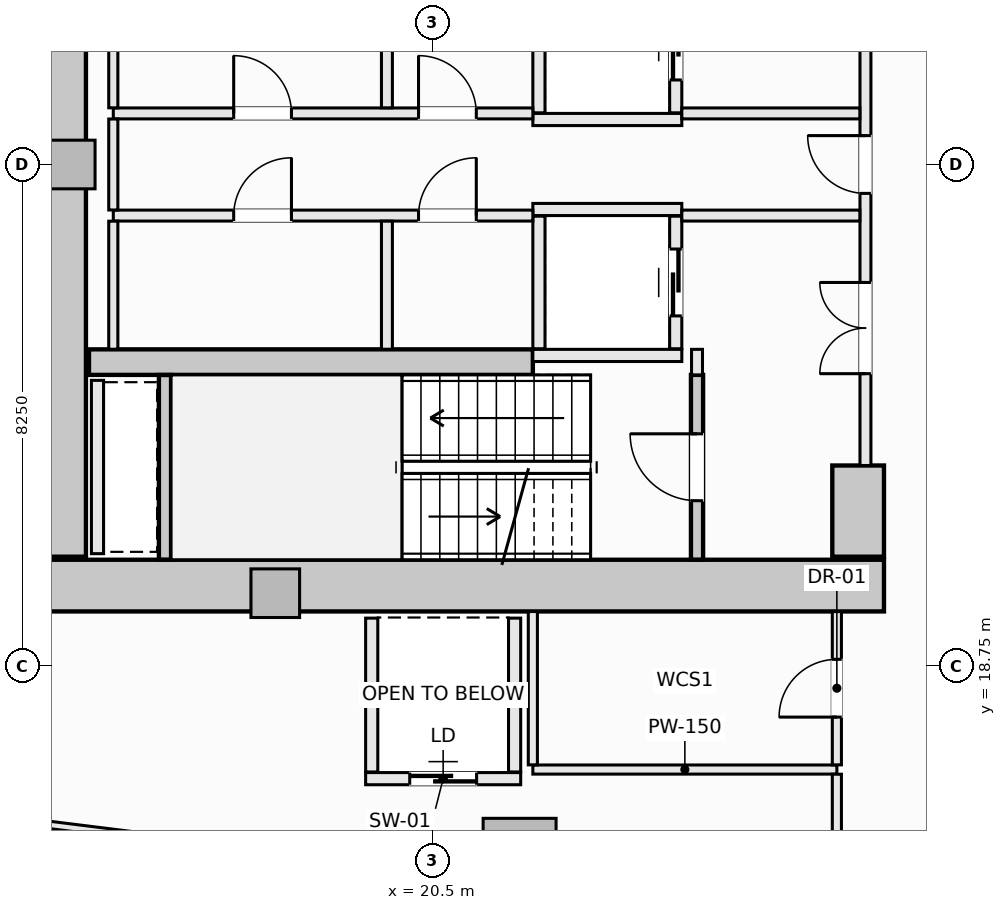
"""IFC4 building model, lengths in metres.
Left out: names, types, materials, properties, quantities, classifications, styles, units other than length and angle.
Written with IfcOpenShell. Run it as: python <this file> out.ifc"""

import sys

from ifc_helpers import new_model, si_unit, direction, frame, frame_2d, origin, origin_2d, place, context, subcontext, project, spatial, rectangle, extrude, element, fill, save


model = new_model("IFC4")
c1 = context("Model", 3, precision=1e-05, world=origin(), true_north=direction((0.0, 1.0)))
c2 = subcontext(c1, "Body", "Model", "MODEL_VIEW")
j1 = project(units=[si_unit("LENGTHUNIT", "METRE"), si_unit("PLANEANGLEUNIT", "RADIAN")], contexts=[c1])
p1 = place(None, origin())
s1 = spatial("IfcSite", under=j1, at=p1, CompositionType="ELEMENT")
p2 = place(p1, origin())
s2 = spatial("IfcBuilding", under=s1, at=p2, CompositionType="ELEMENT")
p3 = place(p2, frame((0.0, 0.0, 84.25)))
s3 = spatial("IfcBuildingStorey", under=s2, at=p3, CompositionType="ELEMENT", Elevation=84.25)
p4 = place(p3, frame((14.075, 20.075, -0.28), z_axis=(0.0, 0.0, 1.0), x_axis=(1.0, 0.0, 0.0)))
e1 = element("IfcWall", 1, at=p4, inside=s3, PredefinedType="SHEAR", context=c2, shape_type="SweptSolid", body=[
    extrude(rectangle(XDim=13.85, YDim=0.85, at=frame_2d((6.925, 0.0))), origin(), (0.0, 0.0, 1.0), 3.85),
])
p5 = place(p3, frame((14.375, 20.55, -0.28), z_axis=(0.0, 0.0, 1.0), x_axis=(0.0, 1.0, 0.0)))
e2 = element("IfcWall", 2, at=p5, inside=s3, PredefinedType="SHEAR", context=c2, shape_type="SweptSolid", body=[
    extrude(rectangle(XDim=12.9, YDim=0.85, at=frame_2d((6.45, 0.0))), origin(), (0.0, 0.0, 1.0), 3.85),
])
p6 = place(p3, frame((27.5, 20.55, -0.28), z_axis=(0.0, 0.0, 1.0), x_axis=(0.0, 1.0, 0.0)))
e3 = element("IfcWall", 3, at=p6, inside=s3, PredefinedType="SHEAR", context=c2, shape_type="SweptSolid", body=[
    extrude(rectangle(XDim=1.5, YDim=0.85, at=frame_2d((0.75, 0.0))), origin(), (0.0, 0.0, 1.0), 3.85),
])
p7 = place(p3, frame((14.85, 23.75, -0.28), z_axis=(0.0, 0.0, 1.0), x_axis=(1.0, 0.0, 0.0)))
e4 = element("IfcWall", 4, at=p7, inside=s3, PredefinedType="SHEAR", context=c2, shape_type="SweptSolid", body=[
    extrude(rectangle(XDim=7.3, YDim=0.42, at=frame_2d((3.65, 0.0))), origin(), (0.0, 0.0, 1.0), 3.85),
])
p8 = place(p3, frame((21.932, 15.648, -0.28), z_axis=(0.0, 0.0, 1.0), x_axis=(1.0, 0.0, 0.0)))
e5 = element("IfcColumn", 5, at=p8, inside=s3, PredefinedType="COLUMN", context=c2, shape_type="SweptSolid", body=[
    extrude(rectangle(XDim=1.2, YDim=1.2, at=origin_2d()), origin(), (0.0, 0.0, 1.0), 3.85),
])
for number, where, z_axis, x_axis in (
    (6, (14.55, 27.0, -0.28), (0.0, 0.0, 1.0), (1.0, 0.0, 0.0)),
    (7, (17.914, 19.95, -0.28), (0.0, 0.0, 1.0), (1.0, 0.0, 0.0)),
):
    element("IfcColumn", number, at=place(p3, frame(where, z_axis=z_axis, x_axis=x_axis)), inside=s3, PredefinedType="PILASTER", context=c2, shape_type="SweptSolid", body=[
        extrude(rectangle(XDim=0.8, YDim=0.8, at=origin_2d()), origin(), (0.0, 0.0, 1.0), 3.85),
    ])
p9 = place(p3, frame((24.85, 20.502, -0.28), z_axis=(0.0, 0.0, 1.0), x_axis=(0.0, 1.0, 0.0)))
e8 = element("IfcWall", 8, at=p9, inside=s3, PredefinedType="SHEAR", context=c2, shape_type="SweptSolid", body=[
    extrude(rectangle(XDim=3.038, YDim=0.2, at=frame_2d((1.519, 0.0))), origin(), (0.0, 0.0, 1.0), 3.85),
])
p10 = place(p9, frame((0.969, 0.0, 0.28)))
e9 = element("IfcOpeningElement", 9, at=p10, cuts=e8, PredefinedType="OPENING", context=c2, shape_type="SweptSolid", body=[
    extrude(rectangle(XDim=1.1, YDim=2.15, at=frame_2d((0.55, 1.075))), frame((0.0, 0.11, 0.0), z_axis=(0.0, -1.0, 0.0), x_axis=(1.0, 0.0, 0.0)), (0.0, 0.0, 1.0), 0.22),
])
p11 = place(p3, frame((16.1, 20.502, -0.28), z_axis=(0.0, 0.0, 1.0), x_axis=(0.0, 1.0, 0.0)))
e10 = element("IfcWall", 10, at=p11, inside=s3, PredefinedType="SHEAR", context=c2, shape_type="SweptSolid", body=[
    extrude(rectangle(XDim=3.036, YDim=0.2, at=frame_2d((1.518, 0.0))), origin(), (0.0, 0.0, 1.0), 3.85),
])
p12 = place(p3, frame((22.15, 27.74, 0.0), z_axis=(0.0, 0.0, 1.0), x_axis=(1.0, 0.0, 0.0)))
e11 = element("IfcWall", 11, at=p12, inside=s3, PredefinedType="SOLIDWALL", context=c2, shape_type="SweptSolid", body=[
    extrude(rectangle(XDim=2.45, YDim=0.2, at=frame_2d((1.225, 0.0))), origin(), (0.0, 0.0, 1.0), 3.57),
])
p13 = place(p3, frame((22.25, 27.85, 0.0), z_axis=(0.0, 0.0, 1.0), x_axis=(0.0, 1.0, 0.0)))
e12 = element("IfcWall", 12, at=p13, inside=s3, PredefinedType="SOLIDWALL", context=c2, shape_type="SweptSolid", body=[
    extrude(rectangle(XDim=2.18, YDim=0.2, at=frame_2d((1.09, 0.0))), origin(), (0.0, 0.0, 1.0), 3.57),
])
p14 = place(p3, frame((24.5, 27.85, 0.0), z_axis=(0.0, 0.0, 1.0), x_axis=(0.0, 1.0, 0.0)))
e13 = element("IfcWall", 13, at=p14, inside=s3, PredefinedType="SOLIDWALL", context=c2, shape_type="SweptSolid", body=[
    extrude(rectangle(XDim=2.18, YDim=0.2, at=frame_2d((1.09, 0.0))), origin(), (0.0, 0.0, 1.0), 3.57),
])
p15 = place(p14, frame((0.54, 0.0, 0.0)))
e14 = element("IfcOpeningElement", 14, at=p15, cuts=e13, PredefinedType="OPENING", context=c2, shape_type="SweptSolid", body=[
    extrude(rectangle(XDim=1.1, YDim=2.2, at=frame_2d((0.55, 1.1))), frame((0.0, 0.11, 0.0), z_axis=(0.0, -1.0, 0.0), x_axis=(1.0, 0.0, 0.0)), (0.0, 0.0, 1.0), 0.22),
])
for number, where, z_axis, x_axis in (
    (15, (22.15, 26.26, 0.0), (0.0, 0.0, 1.0), (1.0, 0.0, 0.0)),
    (16, (22.15, 23.86, 0.0), (0.0, 0.0, 1.0), (1.0, 0.0, 0.0)),
):
    element("IfcWall", number, at=place(p3, frame(where, z_axis=z_axis, x_axis=x_axis)), inside=s3, PredefinedType="SOLIDWALL", context=c2, shape_type="SweptSolid", body=[
        extrude(rectangle(XDim=2.45, YDim=0.2, at=frame_2d((1.225, 0.0))), origin(), (0.0, 0.0, 1.0), 3.57),
    ])
p16 = place(p3, frame((22.25, 23.97, 0.0), z_axis=(0.0, 0.0, 1.0), x_axis=(0.0, 1.0, 0.0)))
e17 = element("IfcWall", 17, at=p16, inside=s3, PredefinedType="SOLIDWALL", context=c2, shape_type="SweptSolid", body=[
    extrude(rectangle(XDim=2.18, YDim=0.2, at=frame_2d((1.09, 0.0))), origin(), (0.0, 0.0, 1.0), 3.57),
])
p17 = place(p3, frame((24.5, 23.97, 0.0), z_axis=(0.0, 0.0, 1.0), x_axis=(0.0, 1.0, 0.0)))
e18 = element("IfcWall", 18, at=p17, inside=s3, PredefinedType="SOLIDWALL", context=c2, shape_type="SweptSolid", body=[
    extrude(rectangle(XDim=2.18, YDim=0.2, at=frame_2d((1.09, 0.0))), origin(), (0.0, 0.0, 1.0), 3.57),
])
p18 = place(p17, frame((0.54, 0.0, 0.0)))
e19 = element("IfcOpeningElement", 19, at=p18, cuts=e18, PredefinedType="OPENING", context=c2, shape_type="SweptSolid", body=[
    extrude(rectangle(XDim=1.1, YDim=2.2, at=frame_2d((0.55, 1.1))), frame((0.0, 0.11, 0.0), z_axis=(0.0, -1.0, 0.0), x_axis=(1.0, 0.0, 0.0)), (0.0, 0.0, 1.0), 0.22),
])
p19 = place(p3, frame((19.4, 16.9, 0.0), z_axis=(0.0, 0.0, 1.0), x_axis=(1.0, 0.0, 0.0)))
e20 = element("IfcWall", 20, at=p19, inside=s3, PredefinedType="SOLIDWALL", context=c2, shape_type="SweptSolid", body=[
    extrude(rectangle(XDim=2.55, YDim=0.2, at=frame_2d((1.275, 0.0))), origin(), (0.0, 0.0, 1.0), 3.57),
])
p20 = place(p19, frame((0.725, 0.0, 0.0)))
e21 = element("IfcOpeningElement", 21, at=p20, cuts=e20, PredefinedType="OPENING", context=c2, shape_type="SweptSolid", body=[
    extrude(rectangle(XDim=1.1, YDim=2.2, at=frame_2d((0.55, 1.1))), frame((0.0, 0.11, 0.0), z_axis=(0.0, -1.0, 0.0), x_axis=(1.0, 0.0, 0.0)), (0.0, 0.0, 1.0), 0.22),
])
for number, where, z_axis, x_axis in (
    (22, (19.5, 17.01, 0.0), (0.0, 0.0, 1.0), (0.0, 1.0, 0.0)),
    (23, (21.85, 17.01, 0.0), (0.0, 0.0, 1.0), (0.0, 1.0, 0.0)),
):
    element("IfcWall", number, at=place(p3, frame(where, z_axis=z_axis, x_axis=x_axis)), inside=s3, PredefinedType="SOLIDWALL", context=c2, shape_type="SweptSolid", body=[
        extrude(rectangle(XDim=2.53, YDim=0.2, at=frame_2d((1.265, 0.0))), origin(), (0.0, 0.0, 1.0), 3.57),
    ])
p21 = place(p3, frame((14.99, 20.6, 0.0), z_axis=(0.0, 0.0, 1.0), x_axis=(0.0, 1.0, 0.0)))
e24 = element("IfcWall", 24, at=p21, inside=s3, PredefinedType="SOLIDWALL", context=c2, shape_type="SweptSolid", body=[
    extrude(rectangle(XDim=2.85, YDim=0.2, at=frame_2d((1.425, 0.0))), origin(), (0.0, 0.0, 1.0), 3.57),
])
p22 = place(p3, frame((24.85, 23.54, 0.0), z_axis=(0.0, 0.0, 1.0), x_axis=(0.0, 1.0, 0.0)))
e25 = element("IfcWall", 25, at=p22, inside=s3, PredefinedType="SOLIDWALL", context=c2, shape_type="SweptSolid", body=[
    extrude(rectangle(XDim=0.42, YDim=0.18, at=frame_2d((0.21, 0.0))), origin(), (0.0, 0.0, 1.0), 3.57),
])
p23 = place(p3, frame((27.62, 22.05, 0.0), z_axis=(0.0, 0.0, 1.0), x_axis=(0.0, 1.0, 0.0)))
e26 = element("IfcWall", 26, at=p23, inside=s3, PredefinedType="SOLIDWALL", context=c2, shape_type="SweptSolid", body=[
    extrude(rectangle(XDim=9.9, YDim=0.18, at=frame_2d((4.95, 0.0))), origin(), (0.0, 0.0, 1.0), 2.662),
])
p24 = place(p23, frame((4.475, 0.0, 0.0)))
e27 = element("IfcOpeningElement", 27, at=p24, cuts=e26, PredefinedType="OPENING", context=c2, shape_type="SweptSolid", body=[
    extrude(rectangle(XDim=0.95, YDim=2.1, at=frame_2d((0.475, 1.05))), frame((0.0, 0.1, 0.0), z_axis=(0.0, -1.0, 0.0), x_axis=(1.0, 0.0, 0.0)), (0.0, 0.0, 1.0), 0.2),
])
p25 = place(p23, frame((6.89, 0.0, 0.0)))
e28 = element("IfcOpeningElement", 28, at=p25, cuts=e26, PredefinedType="OPENING", context=c2, shape_type="SweptSolid", body=[
    extrude(rectangle(XDim=1.5, YDim=2.2, at=frame_2d((0.75, 1.1))), frame((0.0, 0.1, 0.0), z_axis=(0.0, -1.0, 0.0), x_axis=(1.0, 0.0, 0.0)), (0.0, 0.0, 1.0), 0.2),
])
p26 = place(p23, frame((1.51, 0.0, 0.0)))
e29 = element("IfcOpeningElement", 29, at=p26, cuts=e26, PredefinedType="OPENING", context=c2, shape_type="SweptSolid", body=[
    extrude(rectangle(XDim=1.5, YDim=2.2, at=frame_2d((0.75, 1.1))), frame((0.0, 0.1, 0.0), z_axis=(0.0, -1.0, 0.0), x_axis=(1.0, 0.0, 0.0)), (0.0, 0.0, 1.0), 0.2),
])
p27 = place(p3, frame((15.25, 27.84, 0.0), z_axis=(0.0, 0.0, 1.0), x_axis=(1.0, 0.0, 0.0)))
e30 = element("IfcWall", 30, at=p27, inside=s3, PredefinedType="SOLIDWALL", context=c2, shape_type="SweptSolid", body=[
    extrude(rectangle(XDim=6.9, YDim=0.18, at=frame_2d((3.45, 0.0))), origin(), (0.0, 0.0, 1.0), 3.57),
])
p28 = place(p27, frame((5.02, 0.0, 0.0)))
e31 = element("IfcOpeningElement", 31, at=p28, cuts=e30, PredefinedType="OPENING", context=c2, shape_type="SweptSolid", body=[
    extrude(rectangle(XDim=0.95, YDim=2.1, at=frame_2d((0.475, 1.05))), frame((0.0, 0.1, 0.0), z_axis=(0.0, -1.0, 0.0), x_axis=(1.0, 0.0, 0.0)), (0.0, 0.0, 1.0), 0.2),
])
p29 = place(p27, frame((1.98, 0.0, 0.0)))
e32 = element("IfcOpeningElement", 32, at=p29, cuts=e30, PredefinedType="OPENING", context=c2, shape_type="SweptSolid", body=[
    extrude(rectangle(XDim=0.95, YDim=2.1, at=frame_2d((0.475, 1.05))), frame((0.0, 0.1, 0.0), z_axis=(0.0, -1.0, 0.0), x_axis=(1.0, 0.0, 0.0)), (0.0, 0.0, 1.0), 0.2),
])
p30 = place(p3, frame((24.6, 27.84, 0.0), z_axis=(0.0, 0.0, 1.0), x_axis=(1.0, 0.0, 0.0)))
e33 = element("IfcWall", 33, at=p30, inside=s3, PredefinedType="SOLIDWALL", context=c2, shape_type="SweptSolid", body=[
    extrude(rectangle(XDim=2.928, YDim=0.18, at=frame_2d((1.464, 0.0))), origin(), (0.0, 0.0, 1.0), 3.57),
])
p31 = place(p3, frame((15.25, 26.16, 0.0), z_axis=(0.0, 0.0, 1.0), x_axis=(1.0, 0.0, 0.0)))
e34 = element("IfcWall", 34, at=p31, inside=s3, PredefinedType="SOLIDWALL", context=c2, shape_type="SweptSolid", body=[
    extrude(rectangle(XDim=6.9, YDim=0.18, at=frame_2d((3.45, 0.0))), origin(), (0.0, 0.0, 1.0), 3.57),
])
p32 = place(p31, frame((5.02, 0.0, 0.0)))
e35 = element("IfcOpeningElement", 35, at=p32, cuts=e34, PredefinedType="OPENING", context=c2, shape_type="SweptSolid", body=[
    extrude(rectangle(XDim=0.95, YDim=2.1, at=frame_2d((0.475, 1.05))), frame((0.0, 0.1, 0.0), z_axis=(0.0, -1.0, 0.0), x_axis=(1.0, 0.0, 0.0)), (0.0, 0.0, 1.0), 0.2),
])
p33 = place(p31, frame((1.98, 0.0, 0.0)))
e36 = element("IfcOpeningElement", 36, at=p33, cuts=e34, PredefinedType="OPENING", context=c2, shape_type="SweptSolid", body=[
    extrude(rectangle(XDim=0.95, YDim=2.1, at=frame_2d((0.475, 1.05))), frame((0.0, 0.1, 0.0), z_axis=(0.0, -1.0, 0.0), x_axis=(1.0, 0.0, 0.0)), (0.0, 0.0, 1.0), 0.2),
])
p34 = place(p3, frame((24.6, 26.16, 0.0), z_axis=(0.0, 0.0, 1.0), x_axis=(1.0, 0.0, 0.0)))
e37 = element("IfcWall", 37, at=p34, inside=s3, PredefinedType="SOLIDWALL", context=c2, shape_type="SweptSolid", body=[
    extrude(rectangle(XDim=2.928, YDim=0.18, at=frame_2d((1.464, 0.0))), origin(), (0.0, 0.0, 1.0), 3.57),
])
p35 = place(p3, frame((15.25, 23.962, 0.0), z_axis=(0.0, 0.0, 1.0), x_axis=(0.0, 1.0, 0.0)))
e38 = element("IfcWall", 38, at=p35, inside=s3, PredefinedType="PARTITIONING", context=c2, shape_type="SweptSolid", body=[
    extrude(rectangle(XDim=2.106, YDim=0.15, at=frame_2d((1.053, 0.0))), origin(), (0.0, 0.0, 1.0), 3.57),
])
p36 = place(p3, frame((15.25, 26.252, 0.0), z_axis=(0.0, 0.0, 1.0), x_axis=(0.0, 1.0, 0.0)))
e39 = element("IfcWall", 39, at=p36, inside=s3, PredefinedType="PARTITIONING", context=c2, shape_type="SweptSolid", body=[
    extrude(rectangle(XDim=1.496, YDim=0.15, at=frame_2d((0.748, 0.0))), origin(), (0.0, 0.0, 1.0), 3.57),
])
p37 = place(p3, frame((15.25, 27.932, 0.0), z_axis=(0.0, 0.0, 1.0), x_axis=(0.0, 1.0, 0.0)))
e40 = element("IfcWall", 40, at=p37, inside=s3, PredefinedType="PARTITIONING", context=c2, shape_type="SweptSolid", body=[
    extrude(rectangle(XDim=2.106, YDim=0.15, at=frame_2d((1.053, 0.0))), origin(), (0.0, 0.0, 1.0), 3.57),
])
for number, where, z_axis, x_axis in (
    (41, (19.75, 23.962, 0.0), (0.0, 0.0, 1.0), (0.0, 1.0, 0.0)),
    (42, (19.75, 27.932, 0.0), (0.0, 0.0, 1.0), (0.0, 1.0, 0.0)),
):
    element("IfcWall", number, at=place(p3, frame(where, z_axis=z_axis, x_axis=x_axis)), inside=s3, PredefinedType="SOLIDWALL", context=c2, shape_type="SweptSolid", body=[
        extrude(rectangle(XDim=2.106, YDim=0.18, at=frame_2d((1.053, 0.0))), origin(), (0.0, 0.0, 1.0), 3.57),
    ])
p38 = place(p3, frame((22.15, 17.05, 0.0), z_axis=(0.0, 0.0, 1.0), x_axis=(1.0, 0.0, 0.0)))
e43 = element("IfcWall", 43, at=p38, inside=s3, PredefinedType="PARTITIONING", context=c2, shape_type="SweptSolid", body=[
    extrude(rectangle(XDim=5.0, YDim=0.15, at=frame_2d((2.5, 0.0))), origin(), (0.0, 0.0, 1.0), 3.57),
])
p39 = place(p3, frame((22.15, 17.127, 0.0), z_axis=(0.0, 0.0, 1.0), x_axis=(0.0, 1.0, 0.0)))
e44 = element("IfcWall", 44, at=p39, inside=s3, PredefinedType="PARTITIONING", context=c2, shape_type="SweptSolid", body=[
    extrude(rectangle(XDim=2.521, YDim=0.15, at=frame_2d((1.26, 0.0))), origin(), (0.0, 0.0, 1.0), 3.57),
])
p40 = place(p3, frame((27.15, 13.85, 0.0), z_axis=(0.0, 0.0, 1.0), x_axis=(0.0, 1.0, 0.0)))
e45 = element("IfcWall", 45, at=p40, inside=s3, PredefinedType="PARTITIONING", context=c2, shape_type="SweptSolid", body=[
    extrude(rectangle(XDim=3.123, YDim=0.15, at=frame_2d((1.562, 0.0))), origin(), (0.0, 0.0, 1.0), 3.57),
])
p41 = place(p40, frame((1.218, 0.0, 0.0)))
e46 = element("IfcOpeningElement", 46, at=p41, cuts=e45, PredefinedType="OPENING", context=c2, shape_type="SweptSolid", body=[
    extrude(rectangle(XDim=0.95, YDim=2.1, at=frame_2d((0.475, 1.05))), frame((0.0, 0.085, 0.0), z_axis=(0.0, -1.0, 0.0), x_axis=(1.0, 0.0, 0.0)), (0.0, 0.0, 1.0), 0.17),
])
p42 = place(p3, frame((27.15, 17.127, 0.0), z_axis=(0.0, 0.0, 1.0), x_axis=(0.0, 1.0, 0.0)))
e47 = element("IfcWall", 47, at=p42, inside=s3, PredefinedType="PARTITIONING", context=c2, shape_type="SweptSolid", body=[
    extrude(rectangle(XDim=2.521, YDim=0.15, at=frame_2d((1.26, 0.0))), origin(), (0.0, 0.0, 1.0), 3.57),
])
p43 = place(p42, frame((0.785, 0.0, 0.0)))
e48 = element("IfcOpeningElement", 48, at=p43, cuts=e47, PredefinedType="OPENING", context=c2, shape_type="SweptSolid", body=[
    extrude(rectangle(XDim=0.95, YDim=2.1, at=frame_2d((0.475, 1.05))), frame((0.0, 0.085, 0.0), z_axis=(0.0, -1.0, 0.0), x_axis=(1.0, 0.0, 0.0)), (0.0, 0.0, 1.0), 0.17),
])
p44 = place(p3, frame((7.089, 17.026, 0.0), z_axis=(0.0, 0.0, 1.0), x_axis=(0.992316064114, -0.123728852337, 0.0)))
e49 = element("IfcWall", 49, at=p44, inside=s3, PredefinedType="PARTITIONING", context=c2, shape_type="SweptSolid", body=[
    extrude(rectangle(XDim=20.138, YDim=0.12, at=frame_2d((10.069, 0.0))), origin(), (0.0, 0.0, 1.0), 3.205),
])
p45 = place(p10, origin())
e50 = element("IfcDoor", 50, at=p45, inside=s3, OperationType="SINGLE_SWING_RIGHT", PredefinedType="DOOR", context=c2, shape_type="SweptSolid", body=[
    extrude(rectangle(XDim=1.1, YDim=2.15, at=frame_2d((0.55, 1.075))), frame((0.0, 0.025, 0.0), z_axis=(0.0, -1.0, 0.0), x_axis=(1.0, 0.0, 0.0)), (0.0, 0.0, 1.0), 0.05),
])
fill(e9, e50)
p46 = place(p15, origin())
e51 = element("IfcDoor", 51, at=p46, inside=s3, OperationType="SLIDING_TO_LEFT", PredefinedType="DOOR", context=c2, shape_type="SweptSolid", body=[
    extrude(rectangle(XDim=1.1, YDim=2.2, at=frame_2d((0.55, 1.1))), frame((0.0, 0.025, 0.0), z_axis=(0.0, -1.0, 0.0), x_axis=(1.0, 0.0, 0.0)), (0.0, 0.0, 1.0), 0.05),
])
fill(e14, e51)
p47 = place(p18, origin())
e52 = element("IfcDoor", 52, at=p47, inside=s3, OperationType="SLIDING_TO_LEFT", PredefinedType="DOOR", context=c2, shape_type="SweptSolid", body=[
    extrude(rectangle(XDim=1.1, YDim=2.2, at=frame_2d((0.55, 1.1))), frame((0.0, 0.025, 0.0), z_axis=(0.0, -1.0, 0.0), x_axis=(1.0, 0.0, 0.0)), (0.0, 0.0, 1.0), 0.05),
])
fill(e19, e52)
p48 = place(p20, origin())
e53 = element("IfcDoor", 53, at=p48, inside=s3, OperationType="SLIDING_TO_LEFT", PredefinedType="DOOR", context=c2, shape_type="SweptSolid", body=[
    extrude(rectangle(XDim=1.1, YDim=2.2, at=frame_2d((0.55, 1.1))), frame((0.0, 0.025, 0.0), z_axis=(0.0, -1.0, 0.0), x_axis=(1.0, 0.0, 0.0)), (0.0, 0.0, 1.0), 0.05),
])
fill(e21, e53)
p49 = place(p24, origin())
e54 = element("IfcDoor", 54, at=p49, inside=s3, OperationType="SINGLE_SWING_RIGHT", PredefinedType="DOOR", context=c2, shape_type="SweptSolid", body=[
    extrude(rectangle(XDim=0.95, YDim=2.1, at=frame_2d((0.475, 1.05))), frame((0.0, 0.025, 0.0), z_axis=(0.0, -1.0, 0.0), x_axis=(1.0, 0.0, 0.0)), (0.0, 0.0, 1.0), 0.05),
])
fill(e27, e54)
p50 = place(p26, origin())
e55 = element("IfcDoor", 55, at=p50, inside=s3, OperationType="DOUBLE_DOOR_SINGLE_SWING", PredefinedType="DOOR", context=c2, shape_type="SweptSolid", body=[
    extrude(rectangle(XDim=1.5, YDim=2.2, at=frame_2d((0.75, 1.1))), frame((0.0, 0.025, 0.0), z_axis=(0.0, -1.0, 0.0), x_axis=(1.0, 0.0, 0.0)), (0.0, 0.0, 1.0), 0.05),
])
fill(e29, e55)
p51 = place(p28, origin())
e56 = element("IfcDoor", 56, at=p51, inside=s3, OperationType="SINGLE_SWING_LEFT", PredefinedType="DOOR", context=c2, shape_type="SweptSolid", body=[
    extrude(rectangle(XDim=0.95, YDim=2.1, at=frame_2d((0.475, 1.05))), frame((0.0, 0.025, 0.0), z_axis=(0.0, -1.0, 0.0), x_axis=(1.0, 0.0, 0.0)), (0.0, 0.0, 1.0), 0.05),
])
fill(e31, e56)
p52 = place(p32, origin())
e57 = element("IfcDoor", 57, at=p52, inside=s3, OperationType="SINGLE_SWING_RIGHT", PredefinedType="DOOR", context=c2, shape_type="SweptSolid", body=[
    extrude(rectangle(XDim=0.95, YDim=2.1, at=frame_2d((0.475, 1.05))), frame((0.0, 0.025, 0.0), z_axis=(0.0, -1.0, 0.0), x_axis=(1.0, 0.0, 0.0)), (0.0, 0.0, 1.0), 0.05),
])
fill(e35, e57)
p53 = place(p29, origin())
e58 = element("IfcDoor", 58, at=p53, inside=s3, OperationType="SINGLE_SWING_LEFT", PredefinedType="DOOR", context=c2, shape_type="SweptSolid", body=[
    extrude(rectangle(XDim=0.95, YDim=2.1, at=frame_2d((0.475, 1.05))), frame((0.0, 0.025, 0.0), z_axis=(0.0, -1.0, 0.0), x_axis=(1.0, 0.0, 0.0)), (0.0, 0.0, 1.0), 0.05),
])
fill(e32, e58)
p54 = place(p33, origin())
e59 = element("IfcDoor", 59, at=p54, inside=s3, OperationType="SINGLE_SWING_RIGHT", PredefinedType="DOOR", context=c2, shape_type="SweptSolid", body=[
    extrude(rectangle(XDim=0.95, YDim=2.1, at=frame_2d((0.475, 1.05))), frame((0.0, 0.025, 0.0), z_axis=(0.0, -1.0, 0.0), x_axis=(1.0, 0.0, 0.0)), (0.0, 0.0, 1.0), 0.05),
])
fill(e36, e59)
p55 = place(p43, origin())
e60 = element("IfcDoor", 60, at=p55, inside=s3, OperationType="SINGLE_SWING_LEFT", PredefinedType="DOOR", context=c2, shape_type="SweptSolid", body=[
    extrude(rectangle(XDim=0.95, YDim=2.1, at=frame_2d((0.475, 1.05))), frame((0.0, 0.025, 0.0), z_axis=(0.0, -1.0, 0.0), x_axis=(1.0, 0.0, 0.0)), (0.0, 0.0, 1.0), 0.05),
])
fill(e48, e60)
save(model, sys.argv[1])
